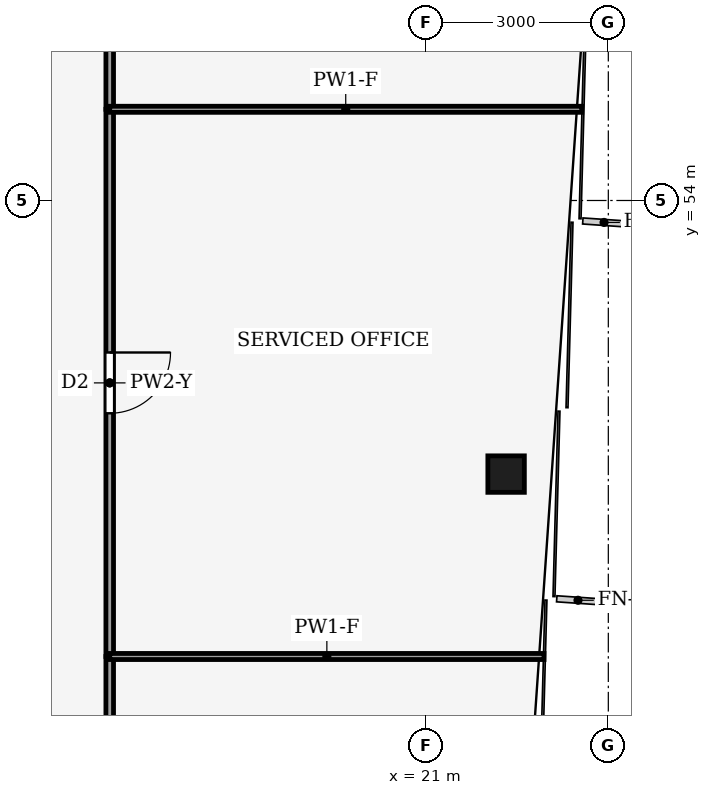
"""IFC4 building model, lengths in metres.
Left out: names, types, materials, properties, quantities, classifications, styles, units other than length and angle.
Written with IfcOpenShell. Run it as: python <this file> out.ifc"""

import sys

from ifc_helpers import new_model, si_unit, direction, frame, frame_2d, origin, origin_2d, place, context, subcontext, project, spatial, rectangle, hollow_rectangle, extrude, element, fill, save


model = new_model("IFC4")
c1 = context("Model", 3, precision=1e-05, world=origin(), true_north=direction((0.0, 1.0)))
c2 = subcontext(c1, "Body", "Model", "MODEL_VIEW")
j1 = project(units=[si_unit("LENGTHUNIT", "METRE"), si_unit("PLANEANGLEUNIT", "RADIAN")], contexts=[c1])
p1 = place(None, origin())
s1 = spatial("IfcSite", under=j1, at=p1, CompositionType="ELEMENT")
p2 = place(p1, origin())
s2 = spatial("IfcBuilding", under=s1, at=p2, CompositionType="ELEMENT")
p3 = place(p2, frame((0.0, 0.0, 274.0)))
s3 = spatial("IfcBuildingStorey", under=s2, at=p3, CompositionType="ELEMENT", Elevation=274.0)
p4 = place(p3, frame((22.319, 49.5, 0.0), z_axis=(0.0, 0.0, 1.0), x_axis=(1.0, 0.0, 0.0)))
e1 = element("IfcColumn", 1, at=p4, inside=s3, PredefinedType="COLUMN", context=c2, shape_type="SweptSolid", body=[
    extrude(hollow_rectangle(XDim=0.6, YDim=0.6, WallThickness=0.025, at=origin_2d()), origin(), (0.0, 0.0, 1.0), 4.0),
])
p5 = place(p3, frame((15.8, 46.5, 0.0), z_axis=(0.0, 0.0, 1.0), x_axis=(0.0, -1.0, 0.0)))
e2 = element("IfcWall", 2, at=p5, inside=s3, PredefinedType="PARTITIONING", context=c2, shape_type="SweptSolid", body=[
    extrude(rectangle(XDim=12.0, YDim=0.125, at=frame_2d((6.0, 0.0))), origin(), (0.0, 0.0, 1.0), 3.14),
])
p6 = place(p5, frame((5.5, 0.0, 0.0)))
e3 = element("IfcOpeningElement", 3, at=p6, cuts=e2, PredefinedType="OPENING", context=c2, shape_type="SweptSolid", body=[
    extrude(rectangle(XDim=1.0, YDim=2.1, at=frame_2d((0.5, 1.05))), frame((0.0, 0.073, 0.0), z_axis=(0.0, -1.0, 0.0), x_axis=(1.0, 0.0, 0.0)), (0.0, 0.0, 1.0), 0.145),
])
p7 = place(p3, frame((15.8, 55.5, 0.0), z_axis=(0.0, 0.0, 1.0), x_axis=(0.0, -1.0, 0.0)))
e4 = element("IfcWall", 4, at=p7, inside=s3, PredefinedType="PARTITIONING", context=c2, shape_type="SweptSolid", body=[
    extrude(rectangle(XDim=9.0, YDim=0.125, at=frame_2d((4.5, 0.0))), origin(), (0.0, 0.0, 1.0), 3.24),
])
p8 = place(p7, frame((4.0, 0.0, 0.0)))
e5 = element("IfcOpeningElement", 5, at=p8, cuts=e4, PredefinedType="OPENING", context=c2, shape_type="SweptSolid", body=[
    extrude(rectangle(XDim=1.0, YDim=2.1, at=frame_2d((0.5, 1.05))), frame((0.0, 0.073, 0.0), z_axis=(0.0, -1.0, 0.0), x_axis=(1.0, 0.0, 0.0)), (0.0, 0.0, 1.0), 0.145),
])
p9 = place(p3, frame((15.8, 68.897, 0.0), z_axis=(0.0, 0.0, 1.0), x_axis=(0.0, -1.0, 0.0)))
e6 = element("IfcWall", 6, at=p9, inside=s3, PredefinedType="PARTITIONING", context=c2, shape_type="SweptSolid", body=[
    extrude(rectangle(XDim=13.397, YDim=0.125, at=frame_2d((6.698, 0.0))), origin(), (0.0, 0.0, 1.0), 3.04),
])
p10 = place(p9, frame((6.263, 0.0, 0.0)))
e7 = element("IfcOpeningElement", 7, at=p10, cuts=e6, PredefinedType="OPENING", context=c2, shape_type="SweptSolid", body=[
    extrude(rectangle(XDim=1.0, YDim=2.1, at=frame_2d((0.5, 1.05))), frame((0.0, 0.073, 0.0), z_axis=(0.0, -1.0, 0.0), x_axis=(1.0, 0.0, 0.0)), (0.0, 0.0, 1.0), 0.145),
])
p11 = place(p3, frame((22.942, 46.5, 0.0), z_axis=(0.0, 0.0, 1.0), x_axis=(-1.0, 0.0, 0.0)))
e8 = element("IfcWall", 8, at=p11, inside=s3, PredefinedType="PARTITIONING", context=c2, shape_type="SweptSolid", body=[
    extrude(rectangle(XDim=7.142, YDim=0.1, at=frame_2d((3.571, 0.0))), origin(), (0.0, 0.0, 1.0), 3.04),
])
p12 = place(p3, frame((23.563, 55.5, 0.0), z_axis=(0.0, 0.0, 1.0), x_axis=(-1.0, 0.0, 0.0)))
e9 = element("IfcWall", 9, at=p12, inside=s3, PredefinedType="PARTITIONING", context=c2, shape_type="SweptSolid", body=[
    extrude(rectangle(XDim=7.763, YDim=0.1, at=frame_2d((3.881, 0.0))), origin(), (0.0, 0.0, 1.0), 3.04),
])
p13 = place(p8, origin())
e10 = element("IfcDoor", 10, at=p13, inside=s3, OperationType="SINGLE_SWING_LEFT", PredefinedType="DOOR", context=c2, shape_type="SweptSolid", body=[
    extrude(rectangle(XDim=1.0, YDim=2.1, at=frame_2d((0.5, 1.05))), frame((0.0, 0.025, 0.0), z_axis=(0.0, -1.0, 0.0), x_axis=(1.0, 0.0, 0.0)), (0.0, 0.0, 1.0), 0.05),
])
fill(e5, e10)
save(model, sys.argv[1])
